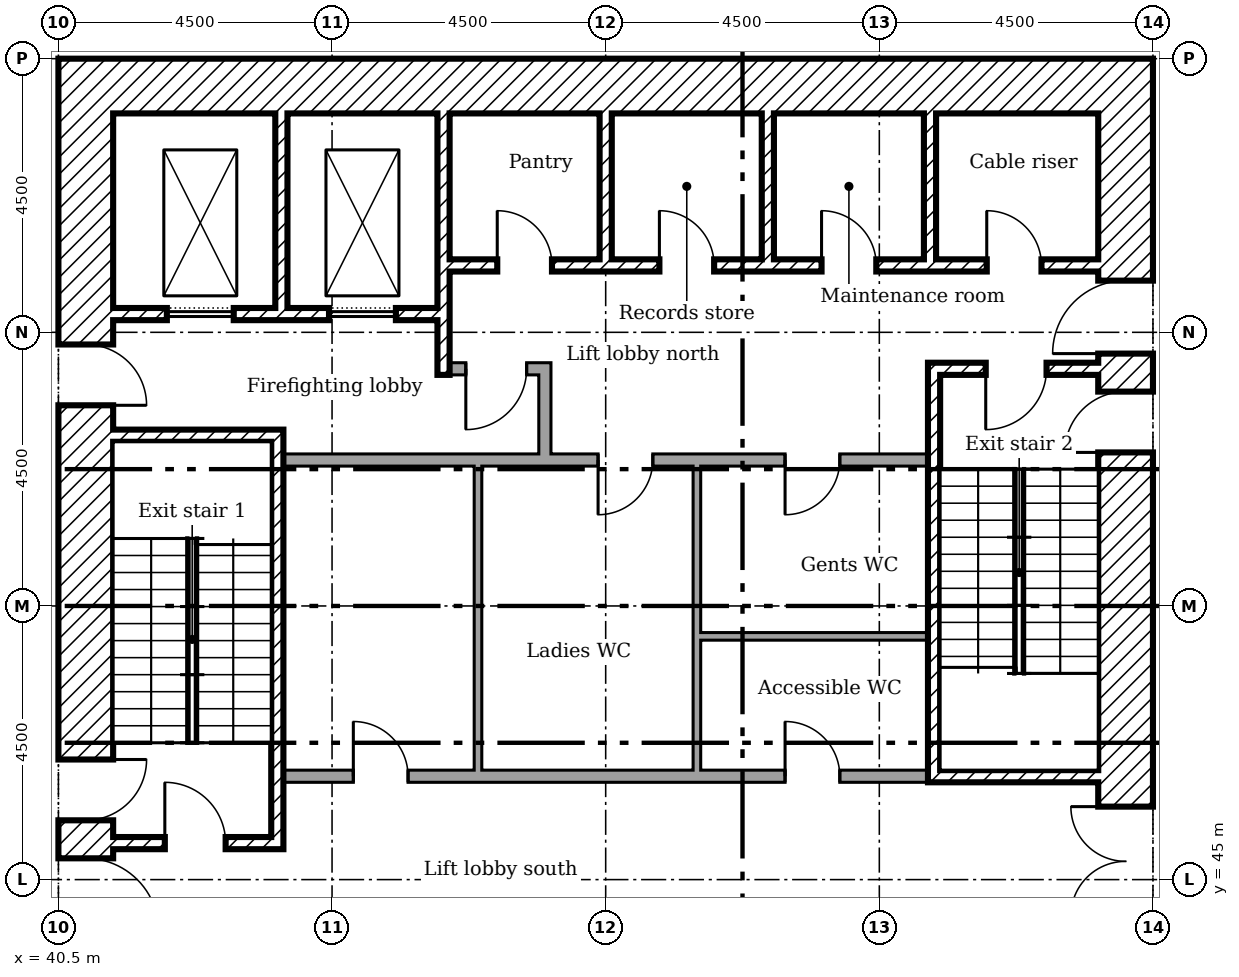
"""IFC4 building model, lengths in metres.
Left out: names, types, materials, properties, quantities, classifications, styles, units other than length and angle.
Written with IfcOpenShell. Run it as: python <this file> out.ifc"""

import sys

from ifc_helpers import new_model, si_unit, direction, frame, frame_2d, origin, place, context, subcontext, project, spatial, rectangle, extrude, element, fill, save


model = new_model("IFC4")
c1 = context("Model", 3, precision=1e-05, world=origin(), true_north=direction((0.0, 1.0)))
c2 = subcontext(c1, "Body", "Model", "MODEL_VIEW")
j1 = project(units=[si_unit("LENGTHUNIT", "METRE"), si_unit("PLANEANGLEUNIT", "RADIAN")], contexts=[c1])
p1 = place(None, origin())
s1 = spatial("IfcSite", under=j1, at=p1, CompositionType="ELEMENT")
p2 = place(p1, origin())
s2 = spatial("IfcBuilding", under=s1, at=p2, CompositionType="ELEMENT")
p3 = place(p2, frame((0.0, 0.0, 21.0)))
s3 = spatial("IfcBuildingStorey", under=s2, at=p3, CompositionType="ELEMENT", Elevation=21.0)
p4 = place(p3, frame((58.05, 40.5, 0.0), z_axis=(0.0, 0.0, 1.0), x_axis=(0.0, 1.0, 0.0)))
e1 = element("IfcWall", 1, at=p4, inside=s3, PredefinedType="SHEAR", context=c2, shape_type="SweptSolid", body=[
    extrude(rectangle(XDim=18.0, YDim=0.9, at=frame_2d((9.0, 0.0))), origin(), (0.0, 0.0, 1.0), 4.125),
])
p5 = place(p4, frame((13.15, 0.0, 0.0)))
e2 = element("IfcOpeningElement", 2, at=p5, cuts=e1, PredefinedType="OPENING", context=c2, shape_type="SweptSolid", body=[
    extrude(rectangle(XDim=1.2, YDim=2.1, at=frame_2d((0.6, 1.05))), frame((0.0, 0.46, 0.0), z_axis=(0.0, -1.0, 0.0), x_axis=(1.0, 0.0, 0.0)), (0.0, 0.0, 1.0), 0.92),
])
p6 = place(p4, frame((3.9, 0.0, 0.0)))
e3 = element("IfcOpeningElement", 3, at=p6, cuts=e1, PredefinedType="OPENING", context=c2, shape_type="SweptSolid", body=[
    extrude(rectangle(XDim=1.8, YDim=2.1, at=frame_2d((0.9, 1.05))), frame((0.0, 0.46, 0.0), z_axis=(0.0, -1.0, 0.0), x_axis=(1.0, 0.0, 0.0)), (0.0, 0.0, 1.0), 0.92),
])
p7 = place(p4, frame((11.525, 0.0, 0.0)))
e4 = element("IfcOpeningElement", 4, at=p7, cuts=e1, PredefinedType="OPENING", context=c2, shape_type="SweptSolid", body=[
    extrude(rectangle(XDim=1.0, YDim=2.1, at=frame_2d((0.5, 1.05))), frame((0.0, 0.46, 0.0), z_axis=(0.0, -1.0, 0.0), x_axis=(1.0, 0.0, 0.0)), (0.0, 0.0, 1.0), 0.92),
])
p8 = place(p3, frame((41.4, 58.05, 0.0)))
e5 = element("IfcWall", 5, at=p8, inside=s3, PredefinedType="SHEAR", context=c2, shape_type="SweptSolid", body=[
    extrude(rectangle(XDim=16.2, YDim=0.9, at=frame_2d((8.1, 0.0))), origin(), (0.0, 0.0, 1.0), 4.125),
])
p9 = place(p3, frame((40.95, 40.5, 0.0), z_axis=(0.0, 0.0, 1.0), x_axis=(0.0, 1.0, 0.0)))
e6 = element("IfcWall", 6, at=p9, inside=s3, PredefinedType="SHEAR", context=c2, shape_type="SweptSolid", body=[
    extrude(rectangle(XDim=18.0, YDim=0.9, at=frame_2d((9.0, 0.0))), origin(), (0.0, 0.0, 1.0), 4.125),
])
p10 = place(p9, frame((3.65, 0.0, 0.0)))
e7 = element("IfcOpeningElement", 7, at=p10, cuts=e6, PredefinedType="OPENING", context=c2, shape_type="SweptSolid", body=[
    extrude(rectangle(XDim=1.2, YDim=2.1, at=frame_2d((0.6, 1.05))), frame((0.0, 0.46, 0.0), z_axis=(0.0, -1.0, 0.0), x_axis=(1.0, 0.0, 0.0)), (0.0, 0.0, 1.0), 0.92),
])
p11 = place(p9, frame((5.475, 0.0, 0.0)))
e8 = element("IfcOpeningElement", 8, at=p11, cuts=e6, PredefinedType="OPENING", context=c2, shape_type="SweptSolid", body=[
    extrude(rectangle(XDim=1.0, YDim=2.1, at=frame_2d((0.5, 1.05))), frame((0.0, 0.46, 0.0), z_axis=(0.0, -1.0, 0.0), x_axis=(1.0, 0.0, 0.0)), (0.0, 0.0, 1.0), 0.92),
])
p12 = place(p9, frame((12.3, 0.0, 0.0)))
e9 = element("IfcOpeningElement", 9, at=p12, cuts=e6, PredefinedType="OPENING", context=c2, shape_type="SweptSolid", body=[
    extrude(rectangle(XDim=1.0, YDim=2.1, at=frame_2d((0.5, 1.05))), frame((0.0, 0.46, 0.0), z_axis=(0.0, -1.0, 0.0), x_axis=(1.0, 0.0, 0.0)), (0.0, 0.0, 1.0), 0.92),
])
p13 = place(p3, frame((44.167, 57.6, 0.0), z_axis=(0.0, 0.0, 1.0), x_axis=(0.0, -1.0, 0.0)))
e10 = element("IfcWall", 10, at=p13, inside=s3, PredefinedType="SHEAR", context=c2, shape_type="SweptSolid", body=[
    extrude(rectangle(XDim=3.2, YDim=0.2, at=frame_2d((1.6, 0.0))), origin(), (0.0, 0.0, 1.0), 4.125),
])
p14 = place(p3, frame((46.833, 57.6, 0.0), z_axis=(0.0, 0.0, 1.0), x_axis=(0.0, -1.0, 0.0)))
e11 = element("IfcWall", 11, at=p14, inside=s3, PredefinedType="SHEAR", context=c2, shape_type="SweptSolid", body=[
    extrude(rectangle(XDim=4.3, YDim=0.2, at=frame_2d((2.15, 0.0))), origin(), (0.0, 0.0, 1.0), 4.125),
])
for number, where, z_axis, x_axis in (
    (12, (49.5, 57.6, 0.0), (0.0, 0.0, 1.0), (0.0, -1.0, 0.0)),
    (13, (52.167, 57.6, 0.0), (0.0, 0.0, 1.0), (0.0, -1.0, 0.0)),
    (14, (54.833, 57.6, 0.0), (0.0, 0.0, 1.0), (0.0, -1.0, 0.0)),
):
    element("IfcWall", number, at=place(p3, frame(where, z_axis=z_axis, x_axis=x_axis)), inside=s3, PredefinedType="SHEAR", context=c2, shape_type="SweptSolid", body=[
        extrude(rectangle(XDim=2.4, YDim=0.2, at=frame_2d((1.2, 0.0))), origin(), (0.0, 0.0, 1.0), 4.125),
    ])
p15 = place(p3, frame((48.5, 51.9, 0.0), z_axis=(0.0, 0.0, 1.0), x_axis=(0.0, 1.0, 0.0)))
e15 = element("IfcWall", 15, at=p15, inside=s3, PredefinedType="PARTITIONING", context=c2, shape_type="SweptSolid", body=[
    extrude(rectangle(XDim=1.6, YDim=0.2, at=frame_2d((0.8, 0.0))), origin(), (0.0, 0.0, 1.0), 4.125),
])
p16 = place(p3, frame((46.933, 53.4, 0.0)))
e16 = element("IfcWall", 16, at=p16, inside=s3, PredefinedType="PARTITIONING", context=c2, shape_type="SweptSolid", body=[
    extrude(rectangle(XDim=1.467, YDim=0.2, at=frame_2d((0.733, 0.0))), origin(), (0.0, 0.0, 1.0), 4.125),
])
p17 = place(p16, frame((0.267, 0.0, 0.0)))
e17 = element("IfcOpeningElement", 17, at=p17, cuts=e16, PredefinedType="OPENING", context=c2, shape_type="SweptSolid", body=[
    extrude(rectangle(XDim=1.0, YDim=2.1, at=frame_2d((0.5, 1.05))), frame((0.0, 0.11, 0.0), z_axis=(0.0, -1.0, 0.0), x_axis=(1.0, 0.0, 0.0)), (0.0, 0.0, 1.0), 0.22),
])
p18 = place(p3, frame((46.933, 55.1, 0.0)))
e18 = element("IfcWall", 18, at=p18, inside=s3, PredefinedType="SHEAR", context=c2, shape_type="SweptSolid", body=[
    extrude(rectangle(XDim=10.667, YDim=0.2, at=frame_2d((5.333, 0.0))), origin(), (0.0, 0.0, 1.0), 4.125),
])
p19 = place(p18, frame((8.833, 0.0, 0.0)))
e19 = element("IfcOpeningElement", 19, at=p19, cuts=e18, PredefinedType="OPENING", context=c2, shape_type="SweptSolid", body=[
    extrude(rectangle(XDim=0.9, YDim=2.1, at=frame_2d((0.45, 1.05))), frame((0.0, 0.11, 0.0), z_axis=(0.0, -1.0, 0.0), x_axis=(1.0, 0.0, 0.0)), (0.0, 0.0, 1.0), 0.22),
])
p20 = place(p18, frame((0.783, 0.0, 0.0)))
e20 = element("IfcOpeningElement", 20, at=p20, cuts=e18, PredefinedType="OPENING", context=c2, shape_type="SweptSolid", body=[
    extrude(rectangle(XDim=0.9, YDim=2.1, at=frame_2d((0.45, 1.05))), frame((0.0, 0.11, 0.0), z_axis=(0.0, -1.0, 0.0), x_axis=(1.0, 0.0, 0.0)), (0.0, 0.0, 1.0), 0.22),
])
p21 = place(p18, frame((3.45, 0.0, 0.0)))
e21 = element("IfcOpeningElement", 21, at=p21, cuts=e18, PredefinedType="OPENING", context=c2, shape_type="SweptSolid", body=[
    extrude(rectangle(XDim=0.9, YDim=2.1, at=frame_2d((0.45, 1.05))), frame((0.0, 0.11, 0.0), z_axis=(0.0, -1.0, 0.0), x_axis=(1.0, 0.0, 0.0)), (0.0, 0.0, 1.0), 0.22),
])
p22 = place(p18, frame((6.117, 0.0, 0.0)))
e22 = element("IfcOpeningElement", 22, at=p22, cuts=e18, PredefinedType="OPENING", context=c2, shape_type="SweptSolid", body=[
    extrude(rectangle(XDim=0.9, YDim=2.1, at=frame_2d((0.45, 1.05))), frame((0.0, 0.11, 0.0), z_axis=(0.0, -1.0, 0.0), x_axis=(1.0, 0.0, 0.0)), (0.0, 0.0, 1.0), 0.22),
])
p23 = place(p3, frame((41.4, 54.3, 0.0)))
e23 = element("IfcWall", 23, at=p23, inside=s3, PredefinedType="SHEAR", context=c2, shape_type="SweptSolid", body=[
    extrude(rectangle(XDim=5.333, YDim=0.2, at=frame_2d((2.667, 0.0))), origin(), (0.0, 0.0, 1.0), 4.125),
])
p24 = place(p23, frame((0.883, 0.0, 0.0)))
e24 = element("IfcOpeningElement", 24, at=p24, cuts=e23, PredefinedType="OPENING", context=c2, shape_type="SweptSolid", body=[
    extrude(rectangle(XDim=1.1, YDim=2.1, at=frame_2d((0.55, 1.05))), frame((0.0, 0.11, 0.0), z_axis=(0.0, -1.0, 0.0), x_axis=(1.0, 0.0, 0.0)), (0.0, 0.0, 1.0), 0.22),
])
p25 = place(p23, frame((3.55, 0.0, 0.0)))
e25 = element("IfcOpeningElement", 25, at=p25, cuts=e23, PredefinedType="OPENING", context=c2, shape_type="SweptSolid", body=[
    extrude(rectangle(XDim=1.1, YDim=2.1, at=frame_2d((0.55, 1.05))), frame((0.0, 0.11, 0.0), z_axis=(0.0, -1.0, 0.0), x_axis=(1.0, 0.0, 0.0)), (0.0, 0.0, 1.0), 0.22),
])
p26 = place(p3, frame((44.1, 45.5, 0.0), z_axis=(0.0, 0.0, 1.0), x_axis=(0.0, 1.0, 0.0)))
e26 = element("IfcWall", 26, at=p26, inside=s3, PredefinedType="SHEAR", context=c2, shape_type="SweptSolid", body=[
    extrude(rectangle(XDim=6.9, YDim=0.2, at=frame_2d((3.45, 0.0))), origin(), (0.0, 0.0, 1.0), 4.125),
])
p27 = place(p3, frame((41.4, 52.3, 0.0)))
e27 = element("IfcWall", 27, at=p27, inside=s3, PredefinedType="SHEAR", context=c2, shape_type="SweptSolid", body=[
    extrude(rectangle(XDim=2.6, YDim=0.2, at=frame_2d((1.3, 0.0))), origin(), (0.0, 0.0, 1.0), 4.125),
])
p28 = place(p3, frame((41.4, 45.6, 0.0)))
e28 = element("IfcWall", 28, at=p28, inside=s3, PredefinedType="SHEAR", context=c2, shape_type="SweptSolid", body=[
    extrude(rectangle(XDim=2.6, YDim=0.2, at=frame_2d((1.3, 0.0))), origin(), (0.0, 0.0, 1.0), 4.125),
])
p29 = place(p28, frame((0.85, 0.0, 0.0)))
e29 = element("IfcOpeningElement", 29, at=p29, cuts=e28, PredefinedType="OPENING", context=c2, shape_type="SweptSolid", body=[
    extrude(rectangle(XDim=1.0, YDim=2.1, at=frame_2d((0.5, 1.05))), frame((0.0, 0.11, 0.0), z_axis=(0.0, -1.0, 0.0), x_axis=(1.0, 0.0, 0.0)), (0.0, 0.0, 1.0), 0.22),
])
p30 = place(p3, frame((54.8, 53.4, 0.0)))
e30 = element("IfcWall", 30, at=p30, inside=s3, PredefinedType="SHEAR", context=c2, shape_type="SweptSolid", body=[
    extrude(rectangle(XDim=2.8, YDim=0.2, at=frame_2d((1.4, 0.0))), origin(), (0.0, 0.0, 1.0), 4.125),
])
p31 = place(p30, frame((0.95, 0.0, 0.0)))
e31 = element("IfcOpeningElement", 31, at=p31, cuts=e30, PredefinedType="OPENING", context=c2, shape_type="SweptSolid", body=[
    extrude(rectangle(XDim=1.0, YDim=2.1, at=frame_2d((0.5, 1.05))), frame((0.0, 0.11, 0.0), z_axis=(0.0, -1.0, 0.0), x_axis=(1.0, 0.0, 0.0)), (0.0, 0.0, 1.0), 0.22),
])
p32 = place(p3, frame((54.8, 46.7, 0.0)))
e32 = element("IfcWall", 32, at=p32, inside=s3, PredefinedType="SHEAR", context=c2, shape_type="SweptSolid", body=[
    extrude(rectangle(XDim=2.8, YDim=0.2, at=frame_2d((1.4, 0.0))), origin(), (0.0, 0.0, 1.0), 4.125),
])
p33 = place(p3, frame((54.9, 46.8, 0.0), z_axis=(0.0, 0.0, 1.0), x_axis=(0.0, 1.0, 0.0)))
e33 = element("IfcWall", 33, at=p33, inside=s3, PredefinedType="SHEAR", context=c2, shape_type="SweptSolid", body=[
    extrude(rectangle(XDim=6.5, YDim=0.2, at=frame_2d((3.25, 0.0))), origin(), (0.0, 0.0, 1.0), 4.125),
])
p34 = place(p3, frame((44.2, 51.9, 0.0)))
e34 = element("IfcWall", 34, at=p34, inside=s3, PredefinedType="PARTITIONING", context=c2, shape_type="SweptSolid", body=[
    extrude(rectangle(XDim=10.6, YDim=0.2, at=frame_2d((5.3, 0.0))), origin(), (0.0, 0.0, 1.0), 4.125),
])
p35 = place(p34, frame((5.175, 0.0, 0.0)))
e35 = element("IfcOpeningElement", 35, at=p35, cuts=e34, PredefinedType="OPENING", context=c2, shape_type="SweptSolid", body=[
    extrude(rectangle(XDim=0.9, YDim=2.1, at=frame_2d((0.45, 1.05))), frame((0.0, 0.11, 0.0), z_axis=(0.0, -1.0, 0.0), x_axis=(1.0, 0.0, 0.0)), (0.0, 0.0, 1.0), 0.22),
])
p36 = place(p34, frame((8.25, 0.0, 0.0)))
e36 = element("IfcOpeningElement", 36, at=p36, cuts=e34, PredefinedType="OPENING", context=c2, shape_type="SweptSolid", body=[
    extrude(rectangle(XDim=0.9, YDim=2.1, at=frame_2d((0.45, 1.05))), frame((0.0, 0.11, 0.0), z_axis=(0.0, -1.0, 0.0), x_axis=(1.0, 0.0, 0.0)), (0.0, 0.0, 1.0), 0.22),
])
p37 = place(p3, frame((44.2, 46.7, 0.0)))
e37 = element("IfcWall", 37, at=p37, inside=s3, PredefinedType="PARTITIONING", context=c2, shape_type="SweptSolid", body=[
    extrude(rectangle(XDim=10.6, YDim=0.2, at=frame_2d((5.3, 0.0))), origin(), (0.0, 0.0, 1.0), 4.125),
])
p38 = place(p37, frame((1.15, 0.0, 0.0)))
e38 = element("IfcOpeningElement", 38, at=p38, cuts=e37, PredefinedType="OPENING", context=c2, shape_type="SweptSolid", body=[
    extrude(rectangle(XDim=0.9, YDim=2.1, at=frame_2d((0.45, 1.05))), frame((0.0, 0.11, 0.0), z_axis=(0.0, -1.0, 0.0), x_axis=(1.0, 0.0, 0.0)), (0.0, 0.0, 1.0), 0.22),
])
p39 = place(p37, frame((8.25, 0.0, 0.0)))
e39 = element("IfcOpeningElement", 39, at=p39, cuts=e37, PredefinedType="OPENING", context=c2, shape_type="SweptSolid", body=[
    extrude(rectangle(XDim=0.9, YDim=2.1, at=frame_2d((0.45, 1.05))), frame((0.0, 0.11, 0.0), z_axis=(0.0, -1.0, 0.0), x_axis=(1.0, 0.0, 0.0)), (0.0, 0.0, 1.0), 0.22),
])
p40 = place(p3, frame((47.4, 46.8, 0.0), z_axis=(0.0, 0.0, 1.0), x_axis=(0.0, 1.0, 0.0)))
e40 = element("IfcWall", 40, at=p40, inside=s3, PredefinedType="PARTITIONING", context=c2, shape_type="SweptSolid", body=[
    extrude(rectangle(XDim=5.0, YDim=0.125, at=frame_2d((2.5, 0.0))), origin(), (0.0, 0.0, 1.0), 4.125),
])
p41 = place(p3, frame((51.0, 46.8, 0.0), z_axis=(0.0, 0.0, 1.0), x_axis=(0.0, 1.0, 0.0)))
e41 = element("IfcWall", 41, at=p41, inside=s3, PredefinedType="PARTITIONING", context=c2, shape_type="SweptSolid", body=[
    extrude(rectangle(XDim=2.262, YDim=0.125, at=frame_2d((1.131, 0.0))), origin(), (0.0, 0.0, 1.0), 4.125),
])
p42 = place(p3, frame((54.8, 49.0, 0.0), z_axis=(0.0, 0.0, 1.0), x_axis=(-1.0, 0.0, 0.0)))
e42 = element("IfcWall", 42, at=p42, inside=s3, PredefinedType="PARTITIONING", context=c2, shape_type="SweptSolid", body=[
    extrude(rectangle(XDim=3.738, YDim=0.125, at=frame_2d((1.869, 0.0))), origin(), (0.0, 0.0, 1.0), 4.125),
])
p43 = place(p3, frame((51.0, 49.0, 0.0), z_axis=(0.0, 0.0, 1.0), x_axis=(0.0, 1.0, 0.0)))
e43 = element("IfcWall", 43, at=p43, inside=s3, PredefinedType="PARTITIONING", context=c2, shape_type="SweptSolid", body=[
    extrude(rectangle(XDim=2.8, YDim=0.125, at=frame_2d((1.4, 0.0))), origin(), (0.0, 0.0, 1.0), 4.125),
])
p44 = place(p5, origin())
e44 = element("IfcDoor", 44, at=p44, inside=s3, OperationType="SINGLE_SWING_RIGHT", PredefinedType="DOOR", context=c2, shape_type="SweptSolid", body=[
    extrude(rectangle(XDim=1.2, YDim=2.1, at=frame_2d((0.6, 1.05))), frame((0.0, 0.025, 0.0), z_axis=(0.0, -1.0, 0.0), x_axis=(1.0, 0.0, 0.0)), (0.0, 0.0, 1.0), 0.05),
])
fill(e2, e44)
p45 = place(p6, origin())
e45 = element("IfcDoor", 45, at=p45, inside=s3, OperationType="DOUBLE_DOOR_SINGLE_SWING", PredefinedType="DOOR", context=c2, shape_type="SweptSolid", body=[
    extrude(rectangle(XDim=1.8, YDim=2.1, at=frame_2d((0.9, 1.05))), frame((0.0, 0.025, 0.0), z_axis=(0.0, -1.0, 0.0), x_axis=(1.0, 0.0, 0.0)), (0.0, 0.0, 1.0), 0.05),
])
fill(e3, e45)
p46 = place(p10, frame((1.2, 0.0, 0.0), x_axis=(-1.0, 0.0, 0.0)))
e46 = element("IfcDoor", 46, at=p46, inside=s3, OperationType="SINGLE_SWING_LEFT", PredefinedType="DOOR", context=c2, shape_type="SweptSolid", body=[
    extrude(rectangle(XDim=1.2, YDim=2.1, at=frame_2d((0.6, 1.05))), frame((0.0, 0.025, 0.0), z_axis=(0.0, -1.0, 0.0), x_axis=(1.0, 0.0, 0.0)), (0.0, 0.0, 1.0), 0.05),
])
fill(e7, e46)
p47 = place(p29, origin())
e47 = element("IfcDoor", 47, at=p47, inside=s3, OperationType="SINGLE_SWING_RIGHT", PredefinedType="DOOR", context=c2, shape_type="SweptSolid", body=[
    extrude(rectangle(XDim=1.0, YDim=2.1, at=frame_2d((0.5, 1.05))), frame((0.0, 0.025, 0.0), z_axis=(0.0, -1.0, 0.0), x_axis=(1.0, 0.0, 0.0)), (0.0, 0.0, 1.0), 0.05),
])
fill(e29, e47)
p48 = place(p11, frame((1.0, 0.0, 0.0), x_axis=(-1.0, 0.0, 0.0)))
e48 = element("IfcDoor", 48, at=p48, inside=s3, OperationType="SINGLE_SWING_RIGHT", PredefinedType="DOOR", context=c2, shape_type="SweptSolid", body=[
    extrude(rectangle(XDim=1.0, YDim=2.1, at=frame_2d((0.5, 1.05))), frame((0.0, 0.025, 0.0), z_axis=(0.0, -1.0, 0.0), x_axis=(1.0, 0.0, 0.0)), (0.0, 0.0, 1.0), 0.05),
])
fill(e8, e48)
p49 = place(p31, frame((1.0, 0.0, 0.0), x_axis=(-1.0, 0.0, 0.0)))
e49 = element("IfcDoor", 49, at=p49, inside=s3, OperationType="SINGLE_SWING_LEFT", PredefinedType="DOOR", context=c2, shape_type="SweptSolid", body=[
    extrude(rectangle(XDim=1.0, YDim=2.1, at=frame_2d((0.5, 1.05))), frame((0.0, 0.025, 0.0), z_axis=(0.0, -1.0, 0.0), x_axis=(1.0, 0.0, 0.0)), (0.0, 0.0, 1.0), 0.05),
])
fill(e31, e49)
p50 = place(p7, origin())
e50 = element("IfcDoor", 50, at=p50, inside=s3, OperationType="SINGLE_SWING_RIGHT", PredefinedType="DOOR", context=c2, shape_type="SweptSolid", body=[
    extrude(rectangle(XDim=1.0, YDim=2.1, at=frame_2d((0.5, 1.05))), frame((0.0, 0.025, 0.0), z_axis=(0.0, -1.0, 0.0), x_axis=(1.0, 0.0, 0.0)), (0.0, 0.0, 1.0), 0.05),
])
fill(e4, e50)
p51 = place(p17, frame((1.0, 0.0, 0.0), x_axis=(-1.0, 0.0, 0.0)))
e51 = element("IfcDoor", 51, at=p51, inside=s3, OperationType="SINGLE_SWING_LEFT", PredefinedType="DOOR", context=c2, shape_type="SweptSolid", body=[
    extrude(rectangle(XDim=1.0, YDim=2.1, at=frame_2d((0.5, 1.05))), frame((0.0, 0.025, 0.0), z_axis=(0.0, -1.0, 0.0), x_axis=(1.0, 0.0, 0.0)), (0.0, 0.0, 1.0), 0.05),
])
fill(e17, e51)
p52 = place(p12, frame((1.0, 0.0, 0.0), x_axis=(-1.0, 0.0, 0.0)))
e52 = element("IfcDoor", 52, at=p52, inside=s3, OperationType="SINGLE_SWING_LEFT", PredefinedType="DOOR", context=c2, shape_type="SweptSolid", body=[
    extrude(rectangle(XDim=1.0, YDim=2.1, at=frame_2d((0.5, 1.05))), frame((0.0, 0.025, 0.0), z_axis=(0.0, -1.0, 0.0), x_axis=(1.0, 0.0, 0.0)), (0.0, 0.0, 1.0), 0.05),
])
fill(e9, e52)
p53 = place(p19, origin())
e53 = element("IfcDoor", 53, at=p53, inside=s3, OperationType="SINGLE_SWING_RIGHT", PredefinedType="DOOR", context=c2, shape_type="SweptSolid", body=[
    extrude(rectangle(XDim=0.9, YDim=2.1, at=frame_2d((0.45, 1.05))), frame((0.0, 0.025, 0.0), z_axis=(0.0, -1.0, 0.0), x_axis=(1.0, 0.0, 0.0)), (0.0, 0.0, 1.0), 0.05),
])
fill(e19, e53)
p54 = place(p20, origin())
e54 = element("IfcDoor", 54, at=p54, inside=s3, OperationType="SINGLE_SWING_RIGHT", PredefinedType="DOOR", context=c2, shape_type="SweptSolid", body=[
    extrude(rectangle(XDim=0.9, YDim=2.1, at=frame_2d((0.45, 1.05))), frame((0.0, 0.025, 0.0), z_axis=(0.0, -1.0, 0.0), x_axis=(1.0, 0.0, 0.0)), (0.0, 0.0, 1.0), 0.05),
])
fill(e20, e54)
p55 = place(p21, origin())
e55 = element("IfcDoor", 55, at=p55, inside=s3, OperationType="SINGLE_SWING_RIGHT", PredefinedType="DOOR", context=c2, shape_type="SweptSolid", body=[
    extrude(rectangle(XDim=0.9, YDim=2.1, at=frame_2d((0.45, 1.05))), frame((0.0, 0.025, 0.0), z_axis=(0.0, -1.0, 0.0), x_axis=(1.0, 0.0, 0.0)), (0.0, 0.0, 1.0), 0.05),
])
fill(e21, e55)
p56 = place(p22, origin())
e56 = element("IfcDoor", 56, at=p56, inside=s3, OperationType="SINGLE_SWING_RIGHT", PredefinedType="DOOR", context=c2, shape_type="SweptSolid", body=[
    extrude(rectangle(XDim=0.9, YDim=2.1, at=frame_2d((0.45, 1.05))), frame((0.0, 0.025, 0.0), z_axis=(0.0, -1.0, 0.0), x_axis=(1.0, 0.0, 0.0)), (0.0, 0.0, 1.0), 0.05),
])
fill(e22, e56)
p57 = place(p38, origin())
e57 = element("IfcDoor", 57, at=p57, inside=s3, OperationType="SINGLE_SWING_RIGHT", PredefinedType="DOOR", context=c2, shape_type="SweptSolid", body=[
    extrude(rectangle(XDim=0.9, YDim=2.1, at=frame_2d((0.45, 1.05))), frame((0.0, 0.025, 0.0), z_axis=(0.0, -1.0, 0.0), x_axis=(1.0, 0.0, 0.0)), (0.0, 0.0, 1.0), 0.05),
])
fill(e38, e57)
p58 = place(p35, frame((0.9, 0.0, 0.0), x_axis=(-1.0, 0.0, 0.0)))
e58 = element("IfcDoor", 58, at=p58, inside=s3, OperationType="SINGLE_SWING_LEFT", PredefinedType="DOOR", context=c2, shape_type="SweptSolid", body=[
    extrude(rectangle(XDim=0.9, YDim=2.1, at=frame_2d((0.45, 1.05))), frame((0.0, 0.025, 0.0), z_axis=(0.0, -1.0, 0.0), x_axis=(1.0, 0.0, 0.0)), (0.0, 0.0, 1.0), 0.05),
])
fill(e35, e58)
p59 = place(p39, origin())
e59 = element("IfcDoor", 59, at=p59, inside=s3, OperationType="SINGLE_SWING_RIGHT", PredefinedType="DOOR", context=c2, shape_type="SweptSolid", body=[
    extrude(rectangle(XDim=0.9, YDim=2.1, at=frame_2d((0.45, 1.05))), frame((0.0, 0.025, 0.0), z_axis=(0.0, -1.0, 0.0), x_axis=(1.0, 0.0, 0.0)), (0.0, 0.0, 1.0), 0.05),
])
fill(e39, e59)
p60 = place(p36, frame((0.9, 0.0, 0.0), x_axis=(-1.0, 0.0, 0.0)))
e60 = element("IfcDoor", 60, at=p60, inside=s3, OperationType="SINGLE_SWING_LEFT", PredefinedType="DOOR", context=c2, shape_type="SweptSolid", body=[
    extrude(rectangle(XDim=0.9, YDim=2.1, at=frame_2d((0.45, 1.05))), frame((0.0, 0.025, 0.0), z_axis=(0.0, -1.0, 0.0), x_axis=(1.0, 0.0, 0.0)), (0.0, 0.0, 1.0), 0.05),
])
fill(e36, e60)
p61 = place(p24, origin())
e61 = element("IfcDoor", 61, at=p61, inside=s3, OperationType="SLIDING_TO_LEFT", PredefinedType="DOOR", context=c2, shape_type="SweptSolid", body=[
    extrude(rectangle(XDim=1.1, YDim=2.1, at=frame_2d((0.55, 1.05))), frame((0.0, 0.025, 0.0), z_axis=(0.0, -1.0, 0.0), x_axis=(1.0, 0.0, 0.0)), (0.0, 0.0, 1.0), 0.05),
])
fill(e24, e61)
p62 = place(p25, origin())
e62 = element("IfcDoor", 62, at=p62, inside=s3, OperationType="SLIDING_TO_LEFT", PredefinedType="DOOR", context=c2, shape_type="SweptSolid", body=[
    extrude(rectangle(XDim=1.1, YDim=2.1, at=frame_2d((0.55, 1.05))), frame((0.0, 0.025, 0.0), z_axis=(0.0, -1.0, 0.0), x_axis=(1.0, 0.0, 0.0)), (0.0, 0.0, 1.0), 0.05),
])
fill(e25, e62)
save(model, sys.argv[1])
